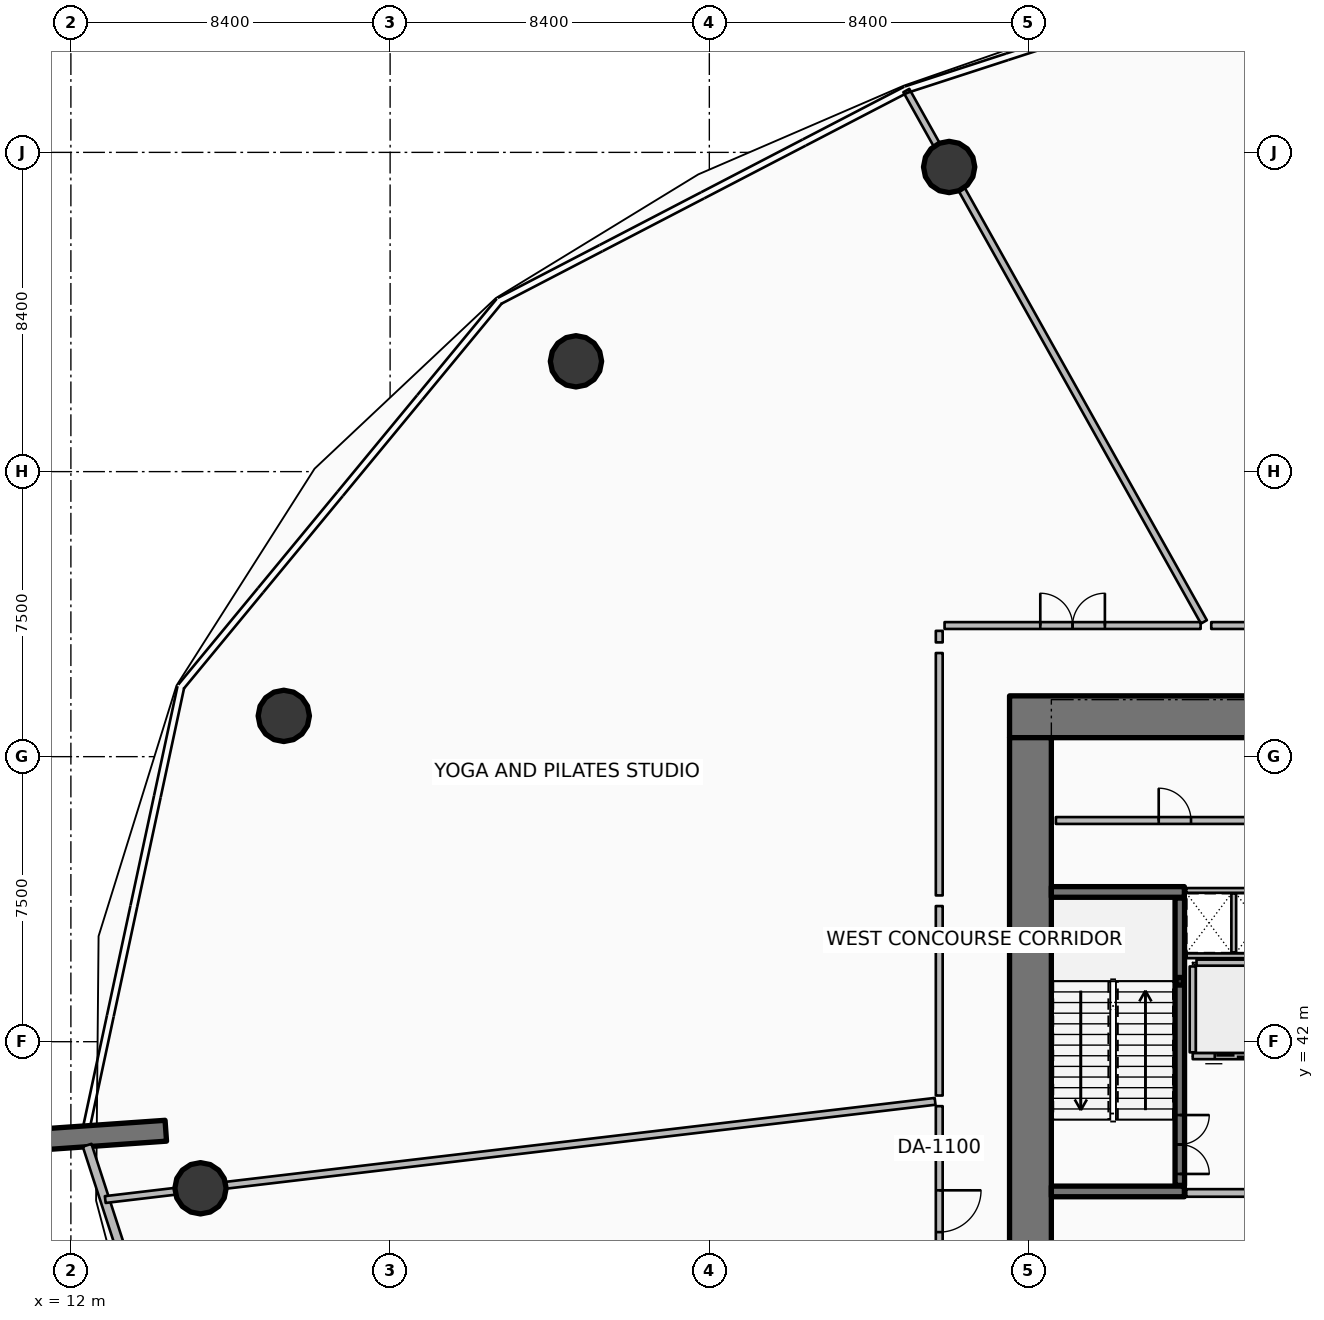
"""IFC4 building model, lengths in metres.
Left out: names, types, materials, properties, quantities, classifications, styles, units other than length and angle.
Written with IfcOpenShell. Run it as: python <this file> out.ifc"""

import sys

from ifc_helpers import new_model, si_unit, direction, frame, frame_2d, origin, origin_2d, place, context, subcontext, project, spatial, rectangle, hollow_rectangle, circle, extrude, element, fill, save


model = new_model("IFC4")
c1 = context("Model", 3, precision=1e-05, world=origin(), true_north=direction((0.0, 1.0)))
c2 = subcontext(c1, "Body", "Model", "MODEL_VIEW")
j1 = project(units=[si_unit("LENGTHUNIT", "METRE"), si_unit("PLANEANGLEUNIT", "RADIAN")], contexts=[c1])
p1 = place(None, origin())
s1 = spatial("IfcSite", under=j1, at=p1, CompositionType="ELEMENT")
p2 = place(p1, origin())
s2 = spatial("IfcBuilding", under=s1, at=p2, CompositionType="ELEMENT")
p3 = place(p2, frame((0.0, 0.0, 16.8)))
s3 = spatial("IfcBuildingStorey", under=s2, at=p3, CompositionType="ELEMENT", Elevation=16.8)
p4 = place(p3, frame((36.7, 50.55, 0.0), z_axis=(0.0, 0.0, 1.0), x_axis=(1.0, 0.0, 0.0)))
e1 = element("IfcWall", 1, at=p4, inside=s3, PredefinedType="SHEAR", context=c2, shape_type="SweptSolid", body=[
    extrude(rectangle(XDim=10.2, YDim=1.1, at=frame_2d((5.1, 0.0))), origin(), (0.0, 0.0, 1.0), 4.8),
])
p5 = place(p3, frame((37.25, 34.0, 0.0), z_axis=(0.0, 0.0, 1.0), x_axis=(0.0, 1.0, 0.0)))
e2 = element("IfcWall", 2, at=p5, inside=s3, PredefinedType="SHEAR", context=c2, shape_type="SweptSolid", body=[
    extrude(rectangle(XDim=16.0, YDim=1.1, at=frame_2d((8.0, 0.0))), origin(), (0.0, 0.0, 1.0), 4.8),
])
for number, where, z_axis, x_axis in (
    (3, (37.8, 38.06, 0.0), (0.0, 0.0, 1.0), (1.0, 0.0, 0.0)),
    (4, (37.8, 45.94, 0.0), (0.0, 0.0, 1.0), (1.0, 0.0, 0.0)),
):
    element("IfcWall", number, at=place(p3, frame(where, z_axis=z_axis, x_axis=x_axis)), inside=s3, PredefinedType="SHEAR", context=c2, shape_type="SweptSolid", body=[
        extrude(rectangle(XDim=3.5, YDim=0.28, at=frame_2d((1.75, 0.0))), origin(), (0.0, 0.0, 1.0), 4.8),
    ])
p6 = place(p3, frame((41.18, 43.59, 0.0), z_axis=(0.0, 0.0, 1.0), x_axis=(1.0, 0.0, 0.0)))
e5 = element("IfcColumn", 5, at=p6, inside=s3, PredefinedType="COLUMN", context=c2, shape_type="SweptSolid", body=[
    extrude(hollow_rectangle(XDim=0.2, YDim=0.2, WallThickness=0.01, InnerFilletRadius=0.01, OuterFilletRadius=0.02, at=origin_2d()), origin(), (0.0, 0.0, 1.0), 2.195),
])
p7 = place(p3, frame((14.497, 39.657, 0.0), z_axis=(0.0, 0.0, 1.0), x_axis=(-0.997564163539, -0.069754853754, 0.0)))
e6 = element("IfcWall", 6, at=p7, inside=s3, PredefinedType="SOLIDWALL", context=c2, shape_type="SweptSolid", body=[
    extrude(rectangle(XDim=3.5, YDim=0.55, at=frame_2d((1.75, 0.0))), origin(), (0.0, 0.0, 1.0), 4.8),
])
for number, where, z_axis, x_axis in (
    (7, (35.111, 65.016, 0.0), (0.0, 0.0, 1.0), (1.0, 0.0, 0.0)),
    (8, (25.291, 59.902, 0.0), (0.0, 0.0, 1.0), (1.0, 0.0, 0.0)),
    (9, (17.602, 50.573, 0.0), (0.0, 0.0, 1.0), (1.0, 0.0, 0.0)),
    (10, (15.41, 38.143, 0.0), (0.0, 0.0, 1.0), (1.0, 0.0, 0.0)),
):
    element("IfcColumn", number, at=place(p3, frame(where, z_axis=z_axis, x_axis=x_axis)), inside=s3, PredefinedType="COLUMN", context=c2, shape_type="SweptSolid", body=[
        extrude(circle(Radius=0.675, at=origin_2d()), origin(), (0.0, 0.0, 1.0), 4.4),
    ])
p8 = place(p3, frame((12.427, 39.275, 0.0), z_axis=(0.0, 0.0, 1.0), x_axis=(0.309022005354, -0.951054888115, 0.0)))
e11 = element("IfcWall", 11, at=p8, inside=s3, PredefinedType="SOLIDWALL", context=c2, shape_type="SweptSolid", body=[
    extrude(rectangle(XDim=16.803, YDim=0.24, at=frame_2d((8.401, 0.0))), origin(), (0.0, 0.0, 1.0), 3.35),
])
p9 = place(p8, frame((7.201, 0.0, 0.85)))
e12 = element("IfcOpeningElement", 12, at=p9, cuts=e11, PredefinedType="OPENING", context=c2, shape_type="SweptSolid", body=[
    extrude(rectangle(XDim=2.4, YDim=2.1, at=frame_2d((1.2, 1.05))), frame((0.0, 0.13, 0.0), z_axis=(0.0, -1.0, 0.0), x_axis=(1.0, 0.0, 0.0)), (0.0, 0.0, 1.0), 0.26),
])
p10 = place(p3, frame((41.18, 38.22, 0.0), z_axis=(0.0, 0.0, 1.0), x_axis=(0.0, 1.0, 0.0)))
e13 = element("IfcWall", 13, at=p10, inside=s3, PredefinedType="SOLIDWALL", context=c2, shape_type="SweptSolid", body=[
    extrude(rectangle(XDim=7.56, YDim=0.25, at=frame_2d((3.78, 0.0))), origin(), (0.0, 0.0, 1.0), 4.4),
])
p11 = place(p10, frame((0.3, 0.0, 0.0)))
e14 = element("IfcOpeningElement", 14, at=p11, cuts=e13, PredefinedType="OPENING", context=c2, shape_type="SweptSolid", body=[
    extrude(rectangle(XDim=1.55, YDim=2.15, at=frame_2d((0.775, 1.075))), frame((0.0, 0.135, 0.0), z_axis=(0.0, -1.0, 0.0), x_axis=(1.0, 0.0, 0.0)), (0.0, 0.0, 1.0), 0.27),
])
p12 = place(p3, frame((43.78, 41.62, 0.0), z_axis=(0.0, 0.0, 1.0), x_axis=(-1.0, 0.0, 0.0)))
e15 = element("IfcWall", 15, at=p12, inside=s3, PredefinedType="PARTITIONING", context=c2, shape_type="SweptSolid", body=[
    extrude(rectangle(XDim=2.26, YDim=0.16, at=frame_2d((1.13, 0.0))), origin(), (0.0, 0.0, 1.0), 4.4),
])
p13 = place(p12, frame((0.58, 0.0, 0.0)))
e16 = element("IfcOpeningElement", 16, at=p13, cuts=e15, PredefinedType="OPENING", context=c2, shape_type="SweptSolid", body=[
    extrude(rectangle(XDim=1.1, YDim=2.1, at=frame_2d((0.55, 1.05))), frame((0.0, 0.09, 0.0), z_axis=(0.0, -1.0, 0.0), x_axis=(1.0, 0.0, 0.0)), (0.0, 0.0, 1.0), 0.18),
])
p14 = place(p3, frame((41.52, 41.72, 0.0), z_axis=(0.0, 0.0, 1.0), x_axis=(0.0, 1.0, 0.0)))
e17 = element("IfcWall", 17, at=p14, inside=s3, PredefinedType="PARTITIONING", context=c2, shape_type="SweptSolid", body=[
    extrude(rectangle(XDim=2.26, YDim=0.16, at=frame_2d((1.13, 0.0))), origin(), (0.0, 0.0, 1.0), 4.4),
])
p15 = place(p3, frame((41.62, 44.08, 0.0), z_axis=(0.0, 0.0, 1.0), x_axis=(1.0, 0.0, 0.0)))
e18 = element("IfcWall", 18, at=p15, inside=s3, PredefinedType="PARTITIONING", context=c2, shape_type="SweptSolid", body=[
    extrude(rectangle(XDim=2.06, YDim=0.16, at=frame_2d((1.03, 0.0))), origin(), (0.0, 0.0, 1.0), 4.4),
])
p16 = place(p3, frame((37.92, 47.82, 0.0), z_axis=(0.0, 0.0, 1.0), x_axis=(1.0, 0.0, 0.0)))
e19 = element("IfcWall", 19, at=p16, inside=s3, PredefinedType="PARTITIONING", context=c2, shape_type="SweptSolid", body=[
    extrude(rectangle(XDim=6.26, YDim=0.18, at=frame_2d((3.13, 0.0))), origin(), (0.0, 0.0, 1.0), 4.4),
])
p17 = place(p16, frame((2.705, 0.0, 0.0)))
e20 = element("IfcOpeningElement", 20, at=p17, cuts=e19, PredefinedType="OPENING", context=c2, shape_type="SweptSolid", body=[
    extrude(rectangle(XDim=0.85, YDim=2.06, at=frame_2d((0.425, 1.03))), frame((0.0, 0.1, 0.0), z_axis=(0.0, -1.0, 0.0), x_axis=(1.0, 0.0, 0.0)), (0.0, 0.0, 1.0), 0.2),
])
p18 = place(p3, frame((41.35, 38.02, 0.0), z_axis=(0.0, 0.0, 1.0), x_axis=(1.0, 0.0, 0.0)))
e21 = element("IfcWall", 21, at=p18, inside=s3, PredefinedType="PARTITIONING", context=c2, shape_type="SweptSolid", body=[
    extrude(rectangle(XDim=5.37, YDim=0.2, at=frame_2d((2.685, 0.0))), origin(), (0.0, 0.0, 1.0), 4.4),
])
p19 = place(p3, frame((41.36, 44.26, 0.0), z_axis=(0.0, 0.0, 1.0), x_axis=(1.0, 0.0, 0.0)))
e22 = element("IfcWall", 22, at=p19, inside=s3, PredefinedType="PARTITIONING", context=c2, shape_type="SweptSolid", body=[
    extrude(rectangle(XDim=2.5, YDim=0.125, at=frame_2d((1.25, 0.0))), origin(), (0.0, 0.0, 1.0), 3.84),
])
p20 = place(p3, frame((42.6, 44.35, 0.0), z_axis=(0.0, 0.0, 1.0), x_axis=(0.0, 1.0, 0.0)))
e23 = element("IfcWall", 23, at=p20, inside=s3, PredefinedType="PARTITIONING", context=c2, shape_type="SweptSolid", body=[
    extrude(rectangle(XDim=1.55, YDim=0.125, at=frame_2d((0.775, 0.0))), origin(), (0.0, 0.0, 1.0), 3.84),
])
p21 = place(p3, frame((41.35, 45.98, 0.0), z_axis=(0.0, 0.0, 1.0), x_axis=(1.0, 0.0, 0.0)))
e24 = element("IfcWall", 24, at=p21, inside=s3, PredefinedType="PARTITIONING", context=c2, shape_type="SweptSolid", body=[
    extrude(rectangle(XDim=2.53, YDim=0.125, at=frame_2d((1.265, 0.0))), origin(), (0.0, 0.0, 1.0), 3.84),
])
p22 = place(p3, frame((46.564, 52.95, 0.0), z_axis=(0.0, 0.0, 1.0), x_axis=(-1.0, 0.0, 0.0)))
e25 = element("IfcWall", 25, at=p22, inside=s3, PredefinedType="PARTITIONING", context=c2, shape_type="SweptSolid", body=[
    extrude(rectangle(XDim=4.556, YDim=0.18, at=frame_2d((2.278, 0.0))), origin(), (0.0, 0.0, 1.0), 3.613),
])
p23 = place(p3, frame((41.814, 53.046, 0.0), z_axis=(0.0, 0.0, 1.0), x_axis=(-0.48862053439, 0.872496403071, 0.0)))
e26 = element("IfcWall", 26, at=p23, inside=s3, PredefinedType="PARTITIONING", context=c2, shape_type="SweptSolid", body=[
    extrude(rectangle(XDim=16.024, YDim=0.18, at=frame_2d((8.012, 0.0))), origin(), (0.0, 0.0, 1.0), 3.613),
])
p24 = place(p3, frame((41.728, 52.95, 0.0), z_axis=(0.0, 0.0, 1.0), x_axis=(-1.0, 0.0, 0.0)))
e27 = element("IfcWall", 27, at=p24, inside=s3, PredefinedType="PARTITIONING", context=c2, shape_type="SweptSolid", body=[
    extrude(rectangle(XDim=6.738, YDim=0.18, at=frame_2d((3.369, 0.0))), origin(), (0.0, 0.0, 1.0), 3.613),
])
p25 = place(p24, frame((2.519, 0.0, 0.0)))
e28 = element("IfcOpeningElement", 28, at=p25, cuts=e27, PredefinedType="OPENING", context=c2, shape_type="SweptSolid", body=[
    extrude(rectangle(XDim=1.7, YDim=2.15, at=frame_2d((0.85, 1.075))), frame((0.0, 0.1, 0.0), z_axis=(0.0, -1.0, 0.0), x_axis=(1.0, 0.0, 0.0)), (0.0, 0.0, 1.0), 0.2),
])
p26 = place(p3, frame((34.85, 52.81, 0.0), z_axis=(0.0, 0.0, 1.0), x_axis=(0.0, -1.0, 0.0)))
e29 = element("IfcWall", 29, at=p26, inside=s3, PredefinedType="PARTITIONING", context=c2, shape_type="SweptSolid", body=[
    extrude(rectangle(XDim=0.303, YDim=0.18, at=frame_2d((0.152, 0.0))), origin(), (0.0, 0.0, 1.0), 3.613),
])
p27 = place(p3, frame((34.85, 52.227, 0.0), z_axis=(0.0, 0.0, 1.0), x_axis=(0.0, -1.0, 0.0)))
e30 = element("IfcWall", 30, at=p27, inside=s3, PredefinedType="PARTITIONING", context=c2, shape_type="SweptSolid", body=[
    extrude(rectangle(XDim=6.378, YDim=0.18, at=frame_2d((3.189, 0.0))), origin(), (0.0, 0.0, 1.0), 3.613),
])
p28 = place(p3, frame((34.85, 45.569, 0.0), z_axis=(0.0, 0.0, 1.0), x_axis=(0.0, -1.0, 0.0)))
e31 = element("IfcWall", 31, at=p28, inside=s3, PredefinedType="PARTITIONING", context=c2, shape_type="SweptSolid", body=[
    extrude(rectangle(XDim=4.985, YDim=0.18, at=frame_2d((2.493, 0.0))), origin(), (0.0, 0.0, 1.0), 3.613),
])
p29 = place(p3, frame((34.741, 40.431, 0.0), z_axis=(0.0, 0.0, 1.0), x_axis=(-0.993068662125, -0.117535663975, 0.0)))
e32 = element("IfcWall", 32, at=p29, inside=s3, PredefinedType="PARTITIONING", context=c2, shape_type="SweptSolid", body=[
    extrude(rectangle(XDim=21.989, YDim=0.18, at=frame_2d((10.994, 0.0))), origin(), (0.0, 0.0, 1.0), 3.613),
])
p30 = place(p3, frame((34.85, 40.304, 0.0), z_axis=(0.0, 0.0, 1.0), x_axis=(0.0, -1.0, 0.0)))
e33 = element("IfcWall", 33, at=p30, inside=s3, PredefinedType="PARTITIONING", context=c2, shape_type="SweptSolid", body=[
    extrude(rectangle(XDim=5.528, YDim=0.18, at=frame_2d((2.764, 0.0))), origin(), (0.0, 0.0, 1.0), 3.613),
])
p31 = place(p30, frame((2.214, 0.0, 0.0)))
e34 = element("IfcOpeningElement", 34, at=p31, cuts=e33, PredefinedType="OPENING", context=c2, shape_type="SweptSolid", body=[
    extrude(rectangle(XDim=1.1, YDim=2.1, at=frame_2d((0.55, 1.05))), frame((0.0, 0.1, 0.0), z_axis=(0.0, -1.0, 0.0), x_axis=(1.0, 0.0, 0.0)), (0.0, 0.0, 1.0), 0.2),
])
p32 = place(p11, origin())
e35 = element("IfcDoor", 35, at=p32, inside=s3, OperationType="DOUBLE_DOOR_SINGLE_SWING", PredefinedType="DOOR", context=c2, shape_type="SweptSolid", body=[
    extrude(rectangle(XDim=1.55, YDim=2.15, at=frame_2d((0.775, 1.075))), frame((0.0, 0.025, 0.0), z_axis=(0.0, -1.0, 0.0), x_axis=(1.0, 0.0, 0.0)), (0.0, 0.0, 1.0), 0.05),
])
fill(e14, e35)
p33 = place(p13, origin())
e36 = element("IfcDoor", 36, at=p33, inside=s3, OperationType="DOUBLE_DOOR_SLIDING", PredefinedType="DOOR", context=c2, shape_type="SweptSolid", body=[
    extrude(rectangle(XDim=1.1, YDim=2.1, at=frame_2d((0.55, 1.05))), frame((0.0, 0.025, 0.0), z_axis=(0.0, -1.0, 0.0), x_axis=(1.0, 0.0, 0.0)), (0.0, 0.0, 1.0), 0.05),
])
fill(e16, e36)
p34 = place(p17, origin())
e37 = element("IfcDoor", 37, at=p34, inside=s3, OperationType="SINGLE_SWING_LEFT", PredefinedType="DOOR", context=c2, shape_type="SweptSolid", body=[
    extrude(rectangle(XDim=0.85, YDim=2.06, at=frame_2d((0.425, 1.03))), frame((0.0, 0.025, 0.0), z_axis=(0.0, -1.0, 0.0), x_axis=(1.0, 0.0, 0.0)), (0.0, 0.0, 1.0), 0.05),
])
fill(e20, e37)
p35 = place(p25, origin())
e38 = element("IfcDoor", 38, at=p35, inside=s3, OperationType="DOUBLE_DOOR_SINGLE_SWING", PredefinedType="DOOR", context=c2, shape_type="SweptSolid", body=[
    extrude(rectangle(XDim=1.7, YDim=2.15, at=frame_2d((0.85, 1.075))), frame((0.0, 0.025, 0.0), z_axis=(0.0, -1.0, 0.0), x_axis=(1.0, 0.0, 0.0)), (0.0, 0.0, 1.0), 0.05),
])
fill(e28, e38)
p36 = place(p31, origin())
e39 = element("IfcDoor", 39, at=p36, inside=s3, OperationType="SINGLE_SWING_LEFT", PredefinedType="DOOR", context=c2, shape_type="SweptSolid", body=[
    extrude(rectangle(XDim=1.1, YDim=2.1, at=frame_2d((0.55, 1.05))), frame((0.0, 0.025, 0.0), z_axis=(0.0, -1.0, 0.0), x_axis=(1.0, 0.0, 0.0)), (0.0, 0.0, 1.0), 0.05),
])
fill(e34, e39)
save(model, sys.argv[1])
